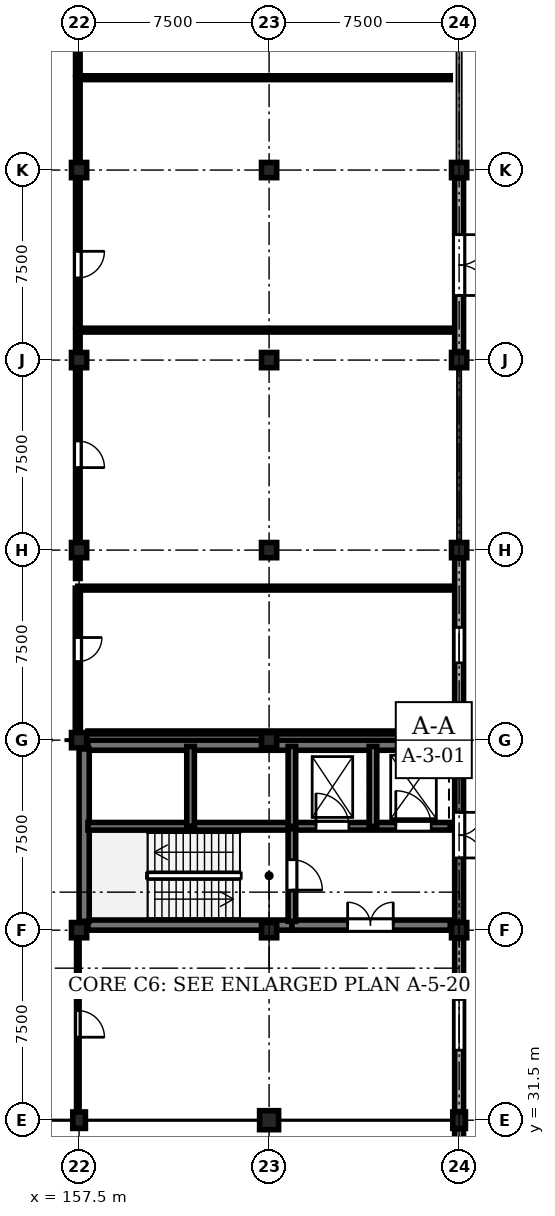
"""IFC4 building model, lengths in metres.
Left out: names, types, materials, properties, quantities, classifications, styles, units other than length and angle.
Written with IfcOpenShell. Run it as: python <this file> out.ifc"""

import sys

from ifc_helpers import new_model, si_unit, direction, frame, frame_2d, origin, origin_2d, place, context, subcontext, project, spatial, rectangle, circle, extrude, element, fill, save


model = new_model("IFC4")
c1 = context("Model", 3, precision=1e-05, world=origin(), true_north=direction((0.0, 1.0)))
c2 = subcontext(c1, "Body", "Model", "MODEL_VIEW")
j1 = project(units=[si_unit("LENGTHUNIT", "METRE"), si_unit("PLANEANGLEUNIT", "RADIAN")], contexts=[c1])
p1 = place(None, origin())
s1 = spatial("IfcSite", under=j1, at=p1, CompositionType="ELEMENT")
p2 = place(p1, origin())
s2 = spatial("IfcBuilding", under=s1, at=p2, CompositionType="ELEMENT")
p3 = place(p2, origin())
s3 = spatial("IfcBuildingStorey", under=s2, at=p3, CompositionType="ELEMENT", Elevation=0.0)
p4 = place(p3, frame((157.5, 31.5, 0.0), z_axis=(0.0, 0.0, 1.0), x_axis=(1.0, 0.0, 0.0)))
e1 = element("IfcColumn", 1, at=p4, inside=s3, PredefinedType="COLUMN", context=c2, shape_type="SweptSolid", body=[
    extrude(rectangle(XDim=0.5, YDim=0.65, at=origin_2d()), origin(), (0.0, 0.0, 1.0), 4.8),
])
p5 = place(p3, frame((157.5, 39.0, 0.0), z_axis=(0.0, 0.0, 1.0), x_axis=(1.0, 0.0, 0.0)))
e2 = element("IfcColumn", 2, at=p5, inside=s3, PredefinedType="COLUMN", context=c2, shape_type="SweptSolid", body=[
    extrude(rectangle(XDim=0.6, YDim=0.6, at=origin_2d()), origin(), (0.0, 0.0, 1.0), 4.8),
])
p6 = place(p3, frame((157.5, 46.5, 0.0), z_axis=(0.0, 0.0, 1.0), x_axis=(1.0, 0.0, 0.0)))
e3 = element("IfcColumn", 3, at=p6, inside=s3, PredefinedType="COLUMN", context=c2, shape_type="SweptSolid", body=[
    extrude(circle(Radius=0.3, at=origin_2d()), origin(), (0.0, 0.0, 1.0), 4.8),
])
for number, where, z_axis, x_axis in (
    (4, (157.5, 54.0, 0.0), (0.0, 0.0, 1.0), (1.0, 0.0, 0.0)),
    (5, (157.5, 61.5, 0.0), (0.0, 0.0, 1.0), (1.0, 0.0, 0.0)),
):
    element("IfcColumn", number, at=place(p3, frame(where, z_axis=z_axis, x_axis=x_axis)), inside=s3, PredefinedType="COLUMN", context=c2, shape_type="SweptSolid", body=[
        extrude(rectangle(XDim=0.6, YDim=0.6, at=origin_2d()), origin(), (0.0, 0.0, 1.0), 4.8),
    ])
p7 = place(p3, frame((157.5, 69.0, 0.0), z_axis=(0.0, 0.0, 1.0), x_axis=(1.0, 0.0, 0.0)))
e6 = element("IfcColumn", 6, at=p7, inside=s3, PredefinedType="COLUMN", context=c2, shape_type="SweptSolid", body=[
    extrude(circle(Radius=0.3, at=origin_2d()), origin(), (0.0, 0.0, 1.0), 4.8),
])
p8 = place(p3, frame((165.0, 31.5, 0.0), z_axis=(0.0, 0.0, 1.0), x_axis=(1.0, 0.0, 0.0)))
e7 = element("IfcColumn", 7, at=p8, inside=s3, PredefinedType="COLUMN", context=c2, shape_type="SweptSolid", body=[
    extrude(rectangle(XDim=0.75, YDim=0.75, at=origin_2d()), origin(), (0.0, 0.0, 1.0), 4.8),
])
p9 = place(p3, frame((165.0, 39.0, 0.0), z_axis=(0.0, 0.0, 1.0), x_axis=(1.0, 0.0, 0.0)))
e8 = element("IfcColumn", 8, at=p9, inside=s3, PredefinedType="COLUMN", context=c2, shape_type="SweptSolid", body=[
    extrude(circle(Radius=0.3, at=origin_2d()), origin(), (0.0, 0.0, 1.0), 4.8),
])
for number, where, z_axis, x_axis in (
    (9, (165.0, 46.5, 0.0), (0.0, 0.0, 1.0), (1.0, 0.0, 0.0)),
    (10, (165.0, 54.0, 0.0), (0.0, 0.0, 1.0), (1.0, 0.0, 0.0)),
):
    element("IfcColumn", number, at=place(p3, frame(where, z_axis=z_axis, x_axis=x_axis)), inside=s3, PredefinedType="COLUMN", context=c2, shape_type="SweptSolid", body=[
        extrude(rectangle(XDim=0.6, YDim=0.6, at=origin_2d()), origin(), (0.0, 0.0, 1.0), 4.8),
    ])
p10 = place(p3, frame((165.0, 61.5, 0.0), z_axis=(0.0, 0.0, 1.0), x_axis=(1.0, 0.0, 0.0)))
e11 = element("IfcColumn", 11, at=p10, inside=s3, PredefinedType="COLUMN", context=c2, shape_type="SweptSolid", body=[
    extrude(circle(Radius=0.3, at=origin_2d()), origin(), (0.0, 0.0, 1.0), 4.8),
])
p11 = place(p3, frame((165.0, 69.0, 0.0), z_axis=(0.0, 0.0, 1.0), x_axis=(1.0, 0.0, 0.0)))
e12 = element("IfcColumn", 12, at=p11, inside=s3, PredefinedType="COLUMN", context=c2, shape_type="SweptSolid", body=[
    extrude(rectangle(XDim=0.6, YDim=0.6, at=origin_2d()), origin(), (0.0, 0.0, 1.0), 4.8),
])
p12 = place(p3, frame((172.5, 31.5, 0.0), z_axis=(0.0, 0.0, 1.0), x_axis=(1.0, 0.0, 0.0)))
e13 = element("IfcColumn", 13, at=p12, inside=s3, PredefinedType="COLUMN", context=c2, shape_type="SweptSolid", body=[
    extrude(rectangle(XDim=0.5, YDim=0.65, at=origin_2d()), origin(), (0.0, 0.0, 1.0), 4.8),
])
for number, where, z_axis, x_axis in (
    (14, (172.5, 39.0, 0.0), (0.0, 0.0, 1.0), (1.0, 0.0, 0.0)),
    (15, (172.5, 46.5, 0.0), (0.0, 0.0, 1.0), (1.0, 0.0, 0.0)),
):
    element("IfcColumn", number, at=place(p3, frame(where, z_axis=z_axis, x_axis=x_axis)), inside=s3, PredefinedType="COLUMN", context=c2, shape_type="SweptSolid", body=[
        extrude(rectangle(XDim=0.6, YDim=0.6, at=origin_2d()), origin(), (0.0, 0.0, 1.0), 4.8),
    ])
p13 = place(p3, frame((172.5, 54.0, 0.0), z_axis=(0.0, 0.0, 1.0), x_axis=(1.0, 0.0, 0.0)))
e16 = element("IfcColumn", 16, at=p13, inside=s3, PredefinedType="COLUMN", context=c2, shape_type="SweptSolid", body=[
    extrude(circle(Radius=0.3, at=origin_2d()), origin(), (0.0, 0.0, 1.0), 4.8),
])
for number, where, z_axis, x_axis in (
    (17, (172.5, 61.5, 0.0), (0.0, 0.0, 1.0), (1.0, 0.0, 0.0)),
    (18, (172.5, 69.0, 0.0), (0.0, 0.0, 1.0), (1.0, 0.0, 0.0)),
):
    element("IfcColumn", number, at=place(p3, frame(where, z_axis=z_axis, x_axis=x_axis)), inside=s3, PredefinedType="COLUMN", context=c2, shape_type="SweptSolid", body=[
        extrude(rectangle(XDim=0.6, YDim=0.6, at=origin_2d()), origin(), (0.0, 0.0, 1.0), 4.8),
    ])
p14 = place(p3, frame((172.5, 31.165, 0.0), z_axis=(0.0, 0.0, 1.0), x_axis=(0.0, -1.0, 0.0)))
e19 = element("IfcWall", 19, at=p14, inside=s3, PredefinedType="STANDARD", context=c2, shape_type="SweptSolid", body=[
    extrude(rectangle(XDim=8.255, YDim=0.35, at=frame_2d((4.127, 0.0))), origin(), (0.0, 0.0, 1.0), 3.95),
])
p15 = place(p14, frame((3.228, 0.0, 0.9)))
e20 = element("IfcOpeningElement", 20, at=p15, cuts=e19, PredefinedType="OPENING", context=c2, shape_type="SweptSolid", body=[
    extrude(rectangle(XDim=1.8, YDim=1.95, at=frame_2d((0.9, 0.975))), frame((0.0, 0.185, 0.0), z_axis=(0.0, -1.0, 0.0), x_axis=(1.0, 0.0, 0.0)), (0.0, 0.0, 1.0), 0.37),
])
p16 = place(p3, frame((172.5, 38.69, 0.0), z_axis=(0.0, 0.0, 1.0), x_axis=(0.0, -1.0, 0.0)))
e21 = element("IfcWall", 21, at=p16, inside=s3, PredefinedType="STANDARD", context=c2, shape_type="SweptSolid", body=[
    extrude(rectangle(XDim=6.855, YDim=0.35, at=frame_2d((3.427, 0.0))), origin(), (0.0, 0.0, 1.0), 3.9),
])
p17 = place(p16, frame((2.427, 0.0, 0.9)))
e22 = element("IfcOpeningElement", 22, at=p17, cuts=e21, PredefinedType="OPENING", context=c2, shape_type="SweptSolid", body=[
    extrude(rectangle(XDim=2.0, YDim=1.95, at=frame_2d((1.0, 0.975))), frame((0.0, 0.185, 0.0), z_axis=(0.0, -1.0, 0.0), x_axis=(1.0, 0.0, 0.0)), (0.0, 0.0, 1.0), 0.37),
])
p18 = place(p3, frame((172.5, 46.19, 0.0), z_axis=(0.0, 0.0, 1.0), x_axis=(0.0, -1.0, 0.0)))
e23 = element("IfcWall", 23, at=p18, inside=s3, PredefinedType="SHEAR", context=c2, shape_type="SweptSolid", body=[
    extrude(rectangle(XDim=6.88, YDim=0.35, at=frame_2d((3.44, 0.0))), origin(), (0.0, 0.0, 1.0), 4.5),
])
p19 = place(p18, frame((2.54, 0.0, 0.0)))
e24 = element("IfcOpeningElement", 24, at=p19, cuts=e23, PredefinedType="OPENING", context=c2, shape_type="SweptSolid", body=[
    extrude(rectangle(XDim=1.8, YDim=2.5, at=frame_2d((0.9, 1.25))), frame((0.0, 0.185, 0.0), z_axis=(0.0, -1.0, 0.0), x_axis=(1.0, 0.0, 0.0)), (0.0, 0.0, 1.0), 0.37),
])
p20 = place(p3, frame((172.5, 53.69, 0.0), z_axis=(0.0, 0.0, 1.0), x_axis=(0.0, -1.0, 0.0)))
e25 = element("IfcWall", 25, at=p20, inside=s3, PredefinedType="STANDARD", context=c2, shape_type="SweptSolid", body=[
    extrude(rectangle(XDim=6.88, YDim=0.35, at=frame_2d((3.44, 0.0))), origin(), (0.0, 0.0, 1.0), 3.9),
])
p21 = place(p20, frame((2.74, 0.0, 0.9)))
e26 = element("IfcOpeningElement", 26, at=p21, cuts=e25, PredefinedType="OPENING", context=c2, shape_type="SweptSolid", body=[
    extrude(rectangle(XDim=1.4, YDim=1.8, at=frame_2d((0.7, 0.9))), frame((0.0, 0.185, 0.0), z_axis=(0.0, -1.0, 0.0), x_axis=(1.0, 0.0, 0.0)), (0.0, 0.0, 1.0), 0.37),
])
p22 = place(p3, frame((172.5, 68.69, 0.0), z_axis=(0.0, 0.0, 1.0), x_axis=(0.0, -1.0, 0.0)))
e27 = element("IfcWall", 27, at=p22, inside=s3, PredefinedType="STANDARD", context=c2, shape_type="SweptSolid", body=[
    extrude(rectangle(XDim=6.88, YDim=0.35, at=frame_2d((3.44, 0.0))), origin(), (0.0, 0.0, 1.0), 3.9),
])
p23 = place(p22, frame((2.24, 0.0, 0.0)))
e28 = element("IfcOpeningElement", 28, at=p23, cuts=e27, PredefinedType="OPENING", context=c2, shape_type="SweptSolid", body=[
    extrude(rectangle(XDim=2.4, YDim=2.7, at=frame_2d((1.2, 1.35))), frame((0.0, 0.185, 0.0), z_axis=(0.0, -1.0, 0.0), x_axis=(1.0, 0.0, 0.0)), (0.0, 0.0, 1.0), 0.37),
])
p24 = place(p3, frame((157.85, 39.2, 0.0), z_axis=(0.0, 0.0, 1.0), x_axis=(1.0, 0.0, 0.0)))
e29 = element("IfcWall", 29, at=p24, inside=s3, PredefinedType="SHEAR", context=c2, shape_type="SweptSolid", body=[
    extrude(rectangle(XDim=8.05, YDim=0.4, at=frame_2d((4.025, 0.0))), origin(), (0.0, 0.0, 1.0), 4.5),
])
p25 = place(p3, frame((165.9, 39.2, 0.0), z_axis=(0.0, 0.0, 1.0), x_axis=(1.0, 0.0, 0.0)))
e30 = element("IfcWall", 30, at=p25, inside=s3, PredefinedType="SHEAR", context=c2, shape_type="SweptSolid", body=[
    extrude(rectangle(XDim=6.25, YDim=0.4, at=frame_2d((3.125, 0.0))), origin(), (0.0, 0.0, 1.0), 4.5),
])
p26 = place(p25, frame((2.2, 0.0, 0.0)))
e31 = element("IfcOpeningElement", 31, at=p26, cuts=e30, PredefinedType="OPENING", context=c2, shape_type="SweptSolid", body=[
    extrude(rectangle(XDim=1.8, YDim=2.25, at=frame_2d((0.9, 1.125))), frame((0.0, 0.21, 0.0), z_axis=(0.0, -1.0, 0.0), x_axis=(1.0, 0.0, 0.0)), (0.0, 0.0, 1.0), 0.42),
])
p27 = place(p3, frame((157.85, 46.3, 0.0), z_axis=(0.0, 0.0, 1.0), x_axis=(1.0, 0.0, 0.0)))
e32 = element("IfcWall", 32, at=p27, inside=s3, PredefinedType="SHEAR", context=c2, shape_type="SweptSolid", body=[
    extrude(rectangle(XDim=14.3, YDim=0.4, at=frame_2d((7.15, 0.0))), origin(), (0.0, 0.0, 1.0), 4.5),
])
p28 = place(p3, frame((157.7, 39.35, 0.0), z_axis=(0.0, 0.0, 1.0), x_axis=(0.0, 1.0, 0.0)))
e33 = element("IfcWall", 33, at=p28, inside=s3, PredefinedType="SHEAR", context=c2, shape_type="SweptSolid", body=[
    extrude(rectangle(XDim=6.8, YDim=0.4, at=frame_2d((3.4, 0.0))), origin(), (0.0, 0.0, 1.0), 4.5),
])
p29 = place(p3, frame((157.85, 43.1, 0.0), z_axis=(0.0, 0.0, 1.0), x_axis=(1.0, 0.0, 0.0)))
e34 = element("IfcWall", 34, at=p29, inside=s3, PredefinedType="SHEAR", context=c2, shape_type="SweptSolid", body=[
    extrude(rectangle(XDim=8.05, YDim=0.3, at=frame_2d((4.025, 0.0))), origin(), (0.0, 0.0, 1.0), 4.5),
])
p30 = place(p3, frame((165.9, 43.1, 0.0), z_axis=(0.0, 0.0, 1.0), x_axis=(1.0, 0.0, 0.0)))
e35 = element("IfcWall", 35, at=p30, inside=s3, PredefinedType="SHEAR", context=c2, shape_type="SweptSolid", body=[
    extrude(rectangle(XDim=6.25, YDim=0.3, at=frame_2d((3.125, 0.0))), origin(), (0.0, 0.0, 1.0), 4.5),
])
p31 = place(p30, frame((0.95, 0.0, 0.0)))
e36 = element("IfcOpeningElement", 36, at=p31, cuts=e35, PredefinedType="OPENING", context=c2, shape_type="SweptSolid", body=[
    extrude(rectangle(XDim=1.3, YDim=2.2, at=frame_2d((0.65, 1.1))), frame((0.0, 0.16, 0.0), z_axis=(0.0, -1.0, 0.0), x_axis=(1.0, 0.0, 0.0)), (0.0, 0.0, 1.0), 0.32),
])
p32 = place(p30, frame((4.1, 0.0, 0.0)))
e37 = element("IfcOpeningElement", 37, at=p32, cuts=e35, PredefinedType="OPENING", context=c2, shape_type="SweptSolid", body=[
    extrude(rectangle(XDim=1.4, YDim=2.25, at=frame_2d((0.7, 1.125))), frame((0.0, 0.16, 0.0), z_axis=(0.0, -1.0, 0.0), x_axis=(1.0, 0.0, 0.0)), (0.0, 0.0, 1.0), 0.32),
])
p33 = place(p3, frame((165.9, 43.0, 0.0), z_axis=(0.0, 0.0, 1.0), x_axis=(0.0, -1.0, 0.0)))
e38 = element("IfcWall", 38, at=p33, inside=s3, PredefinedType="SHEAR", context=c2, shape_type="SweptSolid", body=[
    extrude(rectangle(XDim=3.65, YDim=0.3, at=frame_2d((1.825, 0.0))), origin(), (0.0, 0.0, 1.0), 4.5),
])
p34 = place(p33, frame((1.22, 0.0, 0.0)))
e39 = element("IfcOpeningElement", 39, at=p34, cuts=e38, PredefinedType="OPENING", context=c2, shape_type="SweptSolid", body=[
    extrude(rectangle(XDim=1.2, YDim=2.25, at=frame_2d((0.6, 1.125))), frame((0.0, 0.16, 0.0), z_axis=(0.0, -1.0, 0.0), x_axis=(1.0, 0.0, 0.0)), (0.0, 0.0, 1.0), 0.32),
])
for number, where, z_axis, x_axis in (
    (40, (161.9, 43.1, 0.0), (0.0, 0.0, 1.0), (0.0, 1.0, 0.0)),
    (41, (165.9, 43.1, 0.0), (0.0, 0.0, 1.0), (0.0, 1.0, 0.0)),
    (42, (169.1, 43.1, 0.0), (0.0, 0.0, 1.0), (0.0, 1.0, 0.0)),
):
    element("IfcWall", number, at=place(p3, frame(where, z_axis=z_axis, x_axis=x_axis)), inside=s3, PredefinedType="SHEAR", context=c2, shape_type="SweptSolid", body=[
        extrude(rectangle(XDim=3.15, YDim=0.3, at=frame_2d((1.575, 0.0))), origin(), (0.0, 0.0, 1.0), 4.5),
    ])
p35 = place(p3, frame((157.45, 38.75, 0.0), z_axis=(0.0, 0.0, 1.0), x_axis=(0.0, -1.0, 0.0)))
e43 = element("IfcWall", 43, at=p35, inside=s3, PredefinedType="PARTITIONING", context=c2, shape_type="SweptSolid", body=[
    extrude(rectangle(XDim=6.9, YDim=0.1, at=frame_2d((3.45, 0.0))), origin(), (0.0, 0.0, 1.0), 3.985),
])
p36 = place(p35, frame((2.925, 0.0, 0.0)))
e44 = element("IfcOpeningElement", 44, at=p36, cuts=e43, PredefinedType="OPENING", context=c2, shape_type="SweptSolid", body=[
    extrude(rectangle(XDim=1.05, YDim=2.2, at=frame_2d((0.525, 1.1))), frame((0.0, 0.06, 0.0), z_axis=(0.0, -1.0, 0.0), x_axis=(1.0, 0.0, 0.0)), (0.0, 0.0, 1.0), 0.12),
])
p37 = place(p3, frame((157.45, 52.5, 0.0), z_axis=(0.0, 0.0, 1.0), x_axis=(0.0, -1.0, 0.0)))
e45 = element("IfcWall", 45, at=p37, inside=s3, PredefinedType="STANDARD", context=c2, shape_type="SweptSolid", body=[
    extrude(rectangle(XDim=5.7, YDim=0.2, at=frame_2d((2.85, 0.0))), origin(), (0.0, 0.0, 1.0), 3.985),
])
p38 = place(p37, frame((1.95, 0.0, 0.0)))
e46 = element("IfcOpeningElement", 46, at=p38, cuts=e45, PredefinedType="OPENING", context=c2, shape_type="SweptSolid", body=[
    extrude(rectangle(XDim=0.95, YDim=2.15, at=frame_2d((0.475, 1.075))), frame((0.0, 0.11, 0.0), z_axis=(0.0, -1.0, 0.0), x_axis=(1.0, 0.0, 0.0)), (0.0, 0.0, 1.0), 0.22),
])
p39 = place(p3, frame((157.45, 62.683, 0.0), z_axis=(0.0, 0.0, 1.0), x_axis=(0.0, -1.0, 0.0)))
e47 = element("IfcWall", 47, at=p39, inside=s3, PredefinedType="PARTITIONING", context=c2, shape_type="SweptSolid", body=[
    extrude(rectangle(XDim=9.803, YDim=0.18, at=frame_2d((4.901, 0.0))), origin(), (0.0, 0.0, 1.0), 3.935),
])
p40 = place(p39, frame((4.376, 0.0, 0.0)))
e48 = element("IfcOpeningElement", 48, at=p40, cuts=e47, PredefinedType="OPENING", context=c2, shape_type="SweptSolid", body=[
    extrude(rectangle(XDim=1.05, YDim=2.2, at=frame_2d((0.525, 1.1))), frame((0.0, 0.1, 0.0), z_axis=(0.0, -1.0, 0.0), x_axis=(1.0, 0.0, 0.0)), (0.0, 0.0, 1.0), 0.2),
])
p41 = place(p3, frame((157.45, 72.645, 0.0), z_axis=(0.0, 0.0, 1.0), x_axis=(0.0, -1.0, 0.0)))
e49 = element("IfcWall", 49, at=p41, inside=s3, PredefinedType="PARTITIONING", context=c2, shape_type="SweptSolid", body=[
    extrude(rectangle(XDim=9.802, YDim=0.18, at=frame_2d((4.901, 0.0))), origin(), (0.0, 0.0, 1.0), 3.935),
])
p42 = place(p41, frame((6.852, 0.0, 0.0)))
e50 = element("IfcOpeningElement", 50, at=p42, cuts=e49, PredefinedType="OPENING", context=c2, shape_type="SweptSolid", body=[
    extrude(rectangle(XDim=1.05, YDim=2.2, at=frame_2d((0.525, 1.1))), frame((0.0, 0.1, 0.0), z_axis=(0.0, -1.0, 0.0), x_axis=(1.0, 0.0, 0.0)), (0.0, 0.0, 1.0), 0.2),
])
p43 = place(p3, frame((157.45, 82.607, 0.0), z_axis=(0.0, 0.0, 1.0), x_axis=(0.0, -1.0, 0.0)))
e51 = element("IfcWall", 51, at=p43, inside=s3, PredefinedType="PARTITIONING", context=c2, shape_type="SweptSolid", body=[
    extrude(rectangle(XDim=9.802, YDim=0.18, at=frame_2d((4.901, 0.0))), origin(), (0.0, 0.0, 1.0), 3.785),
])
p44 = place(p43, frame((1.075, 0.0, 0.0)))
e52 = element("IfcOpeningElement", 52, at=p44, cuts=e51, PredefinedType="OPENING", context=c2, shape_type="SweptSolid", body=[
    extrude(rectangle(XDim=1.05, YDim=2.2, at=frame_2d((0.525, 1.1))), frame((0.0, 0.1, 0.0), z_axis=(0.0, -1.0, 0.0), x_axis=(1.0, 0.0, 0.0)), (0.0, 0.0, 1.0), 0.2),
])
for number, where, z_axis, x_axis in (
    (53, (157.45, 52.5, 0.0), (0.0, 0.0, 1.0), (1.0, 0.0, 0.0)),
    (54, (157.45, 62.683, 0.0), (0.0, 0.0, 1.0), (1.0, 0.0, 0.0)),
    (55, (157.45, 72.645, 0.0), (0.0, 0.0, 1.0), (1.0, 0.0, 0.0)),
):
    element("IfcWall", number, at=place(p3, frame(where, z_axis=z_axis, x_axis=x_axis)), inside=s3, PredefinedType="PARTITIONING", context=c2, shape_type="SweptSolid", body=[
        extrude(rectangle(XDim=14.7, YDim=0.15, at=frame_2d((7.35, 0.0))), origin(), (0.0, 0.0, 1.0), 4.485),
    ])
p45 = place(p3, frame((157.85, 46.8, 0.0), z_axis=(0.0, 0.0, 1.0), x_axis=(1.0, 0.0, 0.0)))
e56 = element("IfcWall", 56, at=p45, inside=s3, PredefinedType="PARTITIONING", context=c2, shape_type="SweptSolid", body=[
    extrude(rectangle(XDim=14.3, YDim=0.12, at=frame_2d((7.15, 0.0))), origin(), (0.0, 0.0, 1.0), 3.835),
])
p46 = place(p17, origin())
e57 = element("IfcWindow", 57, at=p46, inside=s3, PartitioningType="SINGLE_PANEL", PredefinedType="WINDOW", context=c2, shape_type="SweptSolid", body=[
    extrude(rectangle(XDim=2.0, YDim=1.95, at=frame_2d((1.0, 0.975))), frame((0.0, 0.03, 0.0), z_axis=(0.0, -1.0, 0.0), x_axis=(1.0, 0.0, 0.0)), (0.0, 0.0, 1.0), 0.06),
])
fill(e22, e57)
p47 = place(p19, origin())
e58 = element("IfcDoor", 58, at=p47, inside=s3, OperationType="DOUBLE_DOOR_SINGLE_SWING", PredefinedType="DOOR", context=c2, shape_type="SweptSolid", body=[
    extrude(rectangle(XDim=1.8, YDim=2.5, at=frame_2d((0.9, 1.25))), frame((0.0, 0.025, 0.0), z_axis=(0.0, -1.0, 0.0), x_axis=(1.0, 0.0, 0.0)), (0.0, 0.0, 1.0), 0.05),
])
fill(e24, e58)
p48 = place(p21, origin())
e59 = element("IfcWindow", 59, at=p48, inside=s3, PartitioningType="SINGLE_PANEL", PredefinedType="WINDOW", context=c2, shape_type="SweptSolid", body=[
    extrude(rectangle(XDim=1.4, YDim=1.8, at=frame_2d((0.7, 0.9))), frame((0.0, 0.03, 0.0), z_axis=(0.0, -1.0, 0.0), x_axis=(1.0, 0.0, 0.0)), (0.0, 0.0, 1.0), 0.06),
])
fill(e26, e59)
p49 = place(p23, origin())
e60 = element("IfcDoor", 60, at=p49, inside=s3, OperationType="DOUBLE_DOOR_SINGLE_SWING", PredefinedType="DOOR", context=c2, shape_type="SweptSolid", body=[
    extrude(rectangle(XDim=2.4, YDim=2.7, at=frame_2d((1.2, 1.35))), frame((0.0, 0.025, 0.0), z_axis=(0.0, -1.0, 0.0), x_axis=(1.0, 0.0, 0.0)), (0.0, 0.0, 1.0), 0.05),
])
fill(e28, e60)
p50 = place(p26, origin())
e61 = element("IfcDoor", 61, at=p50, inside=s3, OperationType="DOUBLE_DOOR_SINGLE_SWING", PredefinedType="DOOR", context=c2, shape_type="SweptSolid", body=[
    extrude(rectangle(XDim=1.8, YDim=2.25, at=frame_2d((0.9, 1.125))), frame((0.0, 0.025, 0.0), z_axis=(0.0, -1.0, 0.0), x_axis=(1.0, 0.0, 0.0)), (0.0, 0.0, 1.0), 0.05),
])
fill(e31, e61)
p51 = place(p31, origin())
e62 = element("IfcDoor", 62, at=p51, inside=s3, OperationType="DOUBLE_DOOR_SLIDING", PredefinedType="DOOR", context=c2, shape_type="SweptSolid", body=[
    extrude(rectangle(XDim=1.3, YDim=2.2, at=frame_2d((0.65, 1.1))), frame((0.0, 0.025, 0.0), z_axis=(0.0, -1.0, 0.0), x_axis=(1.0, 0.0, 0.0)), (0.0, 0.0, 1.0), 0.05),
])
fill(e36, e62)
p52 = place(p32, origin())
e63 = element("IfcDoor", 63, at=p52, inside=s3, OperationType="DOUBLE_DOOR_SLIDING", PredefinedType="DOOR", context=c2, shape_type="SweptSolid", body=[
    extrude(rectangle(XDim=1.4, YDim=2.25, at=frame_2d((0.7, 1.125))), frame((0.0, 0.025, 0.0), z_axis=(0.0, -1.0, 0.0), x_axis=(1.0, 0.0, 0.0)), (0.0, 0.0, 1.0), 0.05),
])
fill(e37, e63)
p53 = place(p34, origin())
e64 = element("IfcDoor", 64, at=p53, inside=s3, OperationType="SINGLE_SWING_RIGHT", PredefinedType="DOOR", context=c2, shape_type="SweptSolid", body=[
    extrude(rectangle(XDim=1.2, YDim=2.25, at=frame_2d((0.6, 1.125))), frame((0.0, 0.025, 0.0), z_axis=(0.0, -1.0, 0.0), x_axis=(1.0, 0.0, 0.0)), (0.0, 0.0, 1.0), 0.05),
])
fill(e39, e64)
p54 = place(p36, origin())
e65 = element("IfcDoor", 65, at=p54, inside=s3, OperationType="SINGLE_SWING_RIGHT", PredefinedType="DOOR", context=c2, shape_type="SweptSolid", body=[
    extrude(rectangle(XDim=1.05, YDim=2.2, at=frame_2d((0.525, 1.1))), frame((0.0, 0.025, 0.0), z_axis=(0.0, -1.0, 0.0), x_axis=(1.0, 0.0, 0.0)), (0.0, 0.0, 1.0), 0.05),
])
fill(e44, e65)
p55 = place(p38, origin())
e66 = element("IfcDoor", 66, at=p55, inside=s3, OperationType="SINGLE_SWING_LEFT", PredefinedType="DOOR", context=c2, shape_type="SweptSolid", body=[
    extrude(rectangle(XDim=0.95, YDim=2.15, at=frame_2d((0.475, 1.075))), frame((0.0, 0.025, 0.0), z_axis=(0.0, -1.0, 0.0), x_axis=(1.0, 0.0, 0.0)), (0.0, 0.0, 1.0), 0.05),
])
fill(e46, e66)
p56 = place(p40, origin())
e67 = element("IfcDoor", 67, at=p56, inside=s3, OperationType="SINGLE_SWING_RIGHT", PredefinedType="DOOR", context=c2, shape_type="SweptSolid", body=[
    extrude(rectangle(XDim=1.05, YDim=2.2, at=frame_2d((0.525, 1.1))), frame((0.0, 0.025, 0.0), z_axis=(0.0, -1.0, 0.0), x_axis=(1.0, 0.0, 0.0)), (0.0, 0.0, 1.0), 0.05),
])
fill(e48, e67)
p57 = place(p42, origin())
e68 = element("IfcDoor", 68, at=p57, inside=s3, OperationType="SINGLE_SWING_LEFT", PredefinedType="DOOR", context=c2, shape_type="SweptSolid", body=[
    extrude(rectangle(XDim=1.05, YDim=2.2, at=frame_2d((0.525, 1.1))), frame((0.0, 0.025, 0.0), z_axis=(0.0, -1.0, 0.0), x_axis=(1.0, 0.0, 0.0)), (0.0, 0.0, 1.0), 0.05),
])
fill(e50, e68)
save(model, sys.argv[1])
